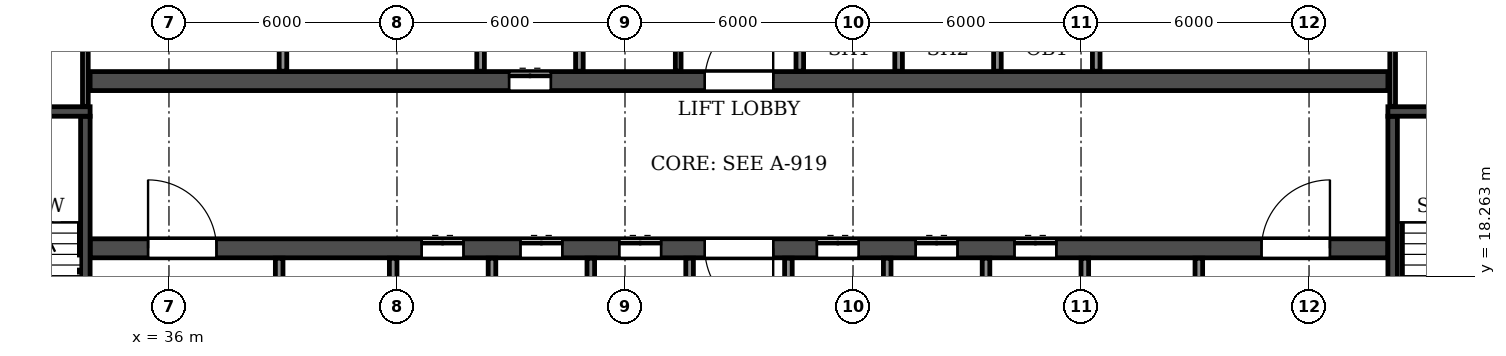
"""IFC4 building model, lengths in metres.
Left out: names, types, materials, properties, quantities, classifications, styles, units other than length and angle.
Written with IfcOpenShell. Run it as: python <this file> out.ifc"""

import sys

from ifc_helpers import new_model, si_unit, direction, frame, frame_2d, origin, place, context, subcontext, project, spatial, rectangle, extrude, element, fill, save


model = new_model("IFC4")
c1 = context("Model", 3, precision=1e-05, world=origin(), true_north=direction((0.0, 1.0)))
c2 = subcontext(c1, "Body", "Model", "MODEL_VIEW")
j1 = project(units=[si_unit("LENGTHUNIT", "METRE"), si_unit("PLANEANGLEUNIT", "RADIAN")], contexts=[c1])
p1 = place(None, origin())
s1 = spatial("IfcSite", under=j1, at=p1, CompositionType="ELEMENT")
p2 = place(p1, origin())
s2 = spatial("IfcBuilding", under=s1, at=p2, CompositionType="ELEMENT")
p3 = place(p2, frame((0.0, 0.0, 105.9)))
s3 = spatial("IfcBuildingStorey", under=s2, at=p3, CompositionType="ELEMENT", Elevation=105.9)
p4 = place(p3, frame((33.925, 19.0, 0.0), z_axis=(0.0, 0.0, 1.0), x_axis=(1.0, 0.0, 0.0)))
e1 = element("IfcWall", 1, at=p4, inside=s3, PredefinedType="SOLIDWALL", context=c2, shape_type="SweptSolid", body=[
    extrude(rectangle(XDim=34.15, YDim=0.5, at=frame_2d((17.075, 0.0))), origin(), (0.0, 0.0, 1.0), 3.06),
])
p5 = place(p4, frame((16.175, 0.0, 0.0)))
e2 = element("IfcOpeningElement", 2, at=p5, cuts=e1, PredefinedType="OPENING", context=c2, shape_type="SweptSolid", body=[
    extrude(rectangle(XDim=1.8, YDim=2.1, at=frame_2d((0.9, 1.05))), frame((0.0, 0.26, 0.0), z_axis=(0.0, -1.0, 0.0), x_axis=(1.0, 0.0, 0.0)), (0.0, 0.0, 1.0), 0.52),
])
p6 = place(p4, frame((1.525, 0.0, 0.0)))
e3 = element("IfcOpeningElement", 3, at=p6, cuts=e1, PredefinedType="OPENING", context=c2, shape_type="SweptSolid", body=[
    extrude(rectangle(XDim=1.8, YDim=2.1, at=frame_2d((0.9, 1.05))), frame((0.0, 0.26, 0.0), z_axis=(0.0, -1.0, 0.0), x_axis=(1.0, 0.0, 0.0)), (0.0, 0.0, 1.0), 0.52),
])
p7 = place(p4, frame((8.725, 0.0, 0.0)))
e4 = element("IfcOpeningElement", 4, at=p7, cuts=e1, PredefinedType="OPENING", context=c2, shape_type="SweptSolid", body=[
    extrude(rectangle(XDim=1.1, YDim=2.1, at=frame_2d((0.55, 1.05))), frame((0.0, 0.26, 0.0), z_axis=(0.0, -1.0, 0.0), x_axis=(1.0, 0.0, 0.0)), (0.0, 0.0, 1.0), 0.52),
])
p8 = place(p4, frame((11.325, 0.0, 0.0)))
e5 = element("IfcOpeningElement", 5, at=p8, cuts=e1, PredefinedType="OPENING", context=c2, shape_type="SweptSolid", body=[
    extrude(rectangle(XDim=1.1, YDim=2.1, at=frame_2d((0.55, 1.05))), frame((0.0, 0.26, 0.0), z_axis=(0.0, -1.0, 0.0), x_axis=(1.0, 0.0, 0.0)), (0.0, 0.0, 1.0), 0.52),
])
p9 = place(p4, frame((13.925, 0.0, 0.0)))
e6 = element("IfcOpeningElement", 6, at=p9, cuts=e1, PredefinedType="OPENING", context=c2, shape_type="SweptSolid", body=[
    extrude(rectangle(XDim=1.1, YDim=2.1, at=frame_2d((0.55, 1.05))), frame((0.0, 0.26, 0.0), z_axis=(0.0, -1.0, 0.0), x_axis=(1.0, 0.0, 0.0)), (0.0, 0.0, 1.0), 0.52),
])
p10 = place(p4, frame((19.125, 0.0, 0.0)))
e7 = element("IfcOpeningElement", 7, at=p10, cuts=e1, PredefinedType="OPENING", context=c2, shape_type="SweptSolid", body=[
    extrude(rectangle(XDim=1.1, YDim=2.1, at=frame_2d((0.55, 1.05))), frame((0.0, 0.26, 0.0), z_axis=(0.0, -1.0, 0.0), x_axis=(1.0, 0.0, 0.0)), (0.0, 0.0, 1.0), 0.52),
])
p11 = place(p4, frame((21.725, 0.0, 0.0)))
e8 = element("IfcOpeningElement", 8, at=p11, cuts=e1, PredefinedType="OPENING", context=c2, shape_type="SweptSolid", body=[
    extrude(rectangle(XDim=1.1, YDim=2.1, at=frame_2d((0.55, 1.05))), frame((0.0, 0.26, 0.0), z_axis=(0.0, -1.0, 0.0), x_axis=(1.0, 0.0, 0.0)), (0.0, 0.0, 1.0), 0.52),
])
p12 = place(p4, frame((24.325, 0.0, 0.0)))
e9 = element("IfcOpeningElement", 9, at=p12, cuts=e1, PredefinedType="OPENING", context=c2, shape_type="SweptSolid", body=[
    extrude(rectangle(XDim=1.1, YDim=2.1, at=frame_2d((0.55, 1.05))), frame((0.0, 0.26, 0.0), z_axis=(0.0, -1.0, 0.0), x_axis=(1.0, 0.0, 0.0)), (0.0, 0.0, 1.0), 0.52),
])
p13 = place(p4, frame((30.825, 0.0, 0.0)))
e10 = element("IfcOpeningElement", 10, at=p13, cuts=e1, PredefinedType="OPENING", context=c2, shape_type="SweptSolid", body=[
    extrude(rectangle(XDim=1.8, YDim=2.1, at=frame_2d((0.9, 1.05))), frame((0.0, 0.26, 0.0), z_axis=(0.0, -1.0, 0.0), x_axis=(1.0, 0.0, 0.0)), (0.0, 0.0, 1.0), 0.52),
])
p14 = place(p3, frame((33.925, 23.4, 0.0), z_axis=(0.0, 0.0, 1.0), x_axis=(1.0, 0.0, 0.0)))
e11 = element("IfcWall", 11, at=p14, inside=s3, PredefinedType="SOLIDWALL", context=c2, shape_type="SweptSolid", body=[
    extrude(rectangle(XDim=34.15, YDim=0.5, at=frame_2d((17.075, 0.0))), origin(), (0.0, 0.0, 1.0), 3.06),
])
p15 = place(p14, frame((16.175, 0.0, 0.0)))
e12 = element("IfcOpeningElement", 12, at=p15, cuts=e11, PredefinedType="OPENING", context=c2, shape_type="SweptSolid", body=[
    extrude(rectangle(XDim=1.8, YDim=2.1, at=frame_2d((0.9, 1.05))), frame((0.0, 0.26, 0.0), z_axis=(0.0, -1.0, 0.0), x_axis=(1.0, 0.0, 0.0)), (0.0, 0.0, 1.0), 0.52),
])
p16 = place(p14, frame((11.025, 0.0, 0.0)))
e13 = element("IfcOpeningElement", 13, at=p16, cuts=e11, PredefinedType="OPENING", context=c2, shape_type="SweptSolid", body=[
    extrude(rectangle(XDim=1.1, YDim=2.1, at=frame_2d((0.55, 1.05))), frame((0.0, 0.26, 0.0), z_axis=(0.0, -1.0, 0.0), x_axis=(1.0, 0.0, 0.0)), (0.0, 0.0, 1.0), 0.52),
])
p17 = place(p3, frame((33.8, 14.85, 0.0), z_axis=(0.0, 0.0, 1.0), x_axis=(0.0, 1.0, 0.0)))
e14 = element("IfcWall", 14, at=p17, inside=s3, PredefinedType="SOLIDWALL", context=c2, shape_type="SweptSolid", body=[
    extrude(rectangle(XDim=7.625, YDim=0.25, at=frame_2d((3.812, 0.0))), origin(), (0.0, 0.0, 1.0), 3.06),
])
p18 = place(p17, frame((0.45, 0.0, 0.0)))
e15 = element("IfcOpeningElement", 15, at=p18, cuts=e14, PredefinedType="OPENING", context=c2, shape_type="SweptSolid", body=[
    extrude(rectangle(XDim=1.0, YDim=2.1, at=frame_2d((0.5, 1.05))), frame((0.0, 0.135, 0.0), z_axis=(0.0, -1.0, 0.0), x_axis=(1.0, 0.0, 0.0)), (0.0, 0.0, 1.0), 0.27),
])
p19 = place(p3, frame((29.875, 22.6, 0.0), z_axis=(0.0, 0.0, 1.0), x_axis=(1.0, 0.0, 0.0)))
e16 = element("IfcWall", 16, at=p19, inside=s3, PredefinedType="SOLIDWALL", context=c2, shape_type="SweptSolid", body=[
    extrude(rectangle(XDim=4.05, YDim=0.25, at=frame_2d((2.025, 0.0))), origin(), (0.0, 0.0, 1.0), 3.06),
])
p20 = place(p3, frame((68.2, 14.85, 0.0), z_axis=(0.0, 0.0, 1.0), x_axis=(0.0, 1.0, 0.0)))
e17 = element("IfcWall", 17, at=p20, inside=s3, PredefinedType="SOLIDWALL", context=c2, shape_type="SweptSolid", body=[
    extrude(rectangle(XDim=7.625, YDim=0.25, at=frame_2d((3.812, 0.0))), origin(), (0.0, 0.0, 1.0), 3.06),
])
p21 = place(p20, frame((0.45, 0.0, 0.0)))
e18 = element("IfcOpeningElement", 18, at=p21, cuts=e17, PredefinedType="OPENING", context=c2, shape_type="SweptSolid", body=[
    extrude(rectangle(XDim=1.0, YDim=2.1, at=frame_2d((0.5, 1.05))), frame((0.0, 0.135, 0.0), z_axis=(0.0, -1.0, 0.0), x_axis=(1.0, 0.0, 0.0)), (0.0, 0.0, 1.0), 0.27),
])
p22 = place(p3, frame((68.075, 22.6, 0.0), z_axis=(0.0, 0.0, 1.0), x_axis=(1.0, 0.0, 0.0)))
e19 = element("IfcWall", 19, at=p22, inside=s3, PredefinedType="SOLIDWALL", context=c2, shape_type="SweptSolid", body=[
    extrude(rectangle(XDim=4.05, YDim=0.25, at=frame_2d((2.025, 0.0))), origin(), (0.0, 0.0, 1.0), 3.06),
])
p23 = place(p3, frame((49.4, 23.66, 0.0), z_axis=(0.0, 0.0, 1.0), x_axis=(0.0, 1.0, 0.0)))
e20 = element("IfcWall", 20, at=p23, inside=s3, PredefinedType="PARTITIONING", context=c2, shape_type="SweptSolid", body=[
    extrude(rectangle(XDim=3.88, YDim=0.15, at=frame_2d((1.94, 0.0))), origin(), (0.0, 0.0, 1.0), 3.06),
])
p24 = place(p3, frame((39.0, 23.66, 0.0), z_axis=(0.0, 0.0, 1.0), x_axis=(0.0, 1.0, 0.0)))
e21 = element("IfcWall", 21, at=p24, inside=s3, PredefinedType="PARTITIONING", context=c2, shape_type="SweptSolid", body=[
    extrude(rectangle(XDim=3.88, YDim=0.2, at=frame_2d((1.94, 0.0))), origin(), (0.0, 0.0, 1.0), 3.06),
])
for number, where, z_axis, x_axis in (
    (22, (33.8, 22.735, 0.0), (0.0, 0.0, 1.0), (0.0, 1.0, 0.0)),
    (23, (68.2, 22.735, 0.0), (0.0, 0.0, 1.0), (0.0, 1.0, 0.0)),
):
    element("IfcWall", number, at=place(p3, frame(where, z_axis=z_axis, x_axis=x_axis)), inside=s3, PredefinedType="PARTITIONING", context=c2, shape_type="SweptSolid", body=[
        extrude(rectangle(XDim=4.805, YDim=0.15, at=frame_2d((2.402, 0.0))), origin(), (0.0, 0.0, 1.0), 3.06),
    ])
p25 = place(p3, frame((38.9, 14.86, 0.0), z_axis=(0.0, 0.0, 1.0), x_axis=(0.0, 1.0, 0.0)))
e24 = element("IfcWall", 24, at=p25, inside=s3, PredefinedType="PARTITIONING", context=c2, shape_type="SweptSolid", body=[
    extrude(rectangle(XDim=3.88, YDim=0.2, at=frame_2d((1.94, 0.0))), origin(), (0.0, 0.0, 1.0), 3.06),
])
p26 = place(p25, frame((1.39, 0.0, 0.0)))
e25 = element("IfcOpeningElement", 25, at=p26, cuts=e24, PredefinedType="OPENING", context=c2, shape_type="SweptSolid", body=[
    extrude(rectangle(XDim=1.1, YDim=2.1, at=frame_2d((0.55, 1.05))), frame((0.0, 0.11, 0.0), z_axis=(0.0, -1.0, 0.0), x_axis=(1.0, 0.0, 0.0)), (0.0, 0.0, 1.0), 0.22),
])
p27 = place(p3, frame((41.9, 14.86, 0.0), z_axis=(0.0, 0.0, 1.0), x_axis=(0.0, 1.0, 0.0)))
e26 = element("IfcWall", 26, at=p27, inside=s3, PredefinedType="PARTITIONING", context=c2, shape_type="SweptSolid", body=[
    extrude(rectangle(XDim=3.88, YDim=0.2, at=frame_2d((1.94, 0.0))), origin(), (0.0, 0.0, 1.0), 3.06),
])
p28 = place(p3, frame((44.2, 23.66, 0.0), z_axis=(0.0, 0.0, 1.0), x_axis=(0.0, 1.0, 0.0)))
e27 = element("IfcWall", 27, at=p28, inside=s3, PredefinedType="PARTITIONING", context=c2, shape_type="SweptSolid", body=[
    extrude(rectangle(XDim=3.88, YDim=0.2, at=frame_2d((1.94, 0.0))), origin(), (0.0, 0.0, 1.0), 3.06),
])
p29 = place(p3, frame((44.5, 16.3, 0.0), z_axis=(0.0, 0.0, 1.0), x_axis=(0.0, 1.0, 0.0)))
e28 = element("IfcWall", 28, at=p29, inside=s3, PredefinedType="PARTITIONING", context=c2, shape_type="SweptSolid", body=[
    extrude(rectangle(XDim=2.44, YDim=0.2, at=frame_2d((1.22, 0.0))), origin(), (0.0, 0.0, 1.0), 3.06),
])
p30 = place(p3, frame((46.8, 23.66, 0.0), z_axis=(0.0, 0.0, 1.0), x_axis=(0.0, 1.0, 0.0)))
e29 = element("IfcWall", 29, at=p30, inside=s3, PredefinedType="PARTITIONING", context=c2, shape_type="SweptSolid", body=[
    extrude(rectangle(XDim=3.88, YDim=0.2, at=frame_2d((1.94, 0.0))), origin(), (0.0, 0.0, 1.0), 3.06),
])
for number, where, z_axis, x_axis in (
    (30, (47.1, 16.3, 0.0), (0.0, 0.0, 1.0), (0.0, 1.0, 0.0)),
    (31, (49.7, 16.3, 0.0), (0.0, 0.0, 1.0), (0.0, 1.0, 0.0)),
    (32, (52.3, 16.3, 0.0), (0.0, 0.0, 1.0), (0.0, 1.0, 0.0)),
):
    element("IfcWall", number, at=place(p3, frame(where, z_axis=z_axis, x_axis=x_axis)), inside=s3, PredefinedType="PARTITIONING", context=c2, shape_type="SweptSolid", body=[
        extrude(rectangle(XDim=2.44, YDim=0.2, at=frame_2d((1.22, 0.0))), origin(), (0.0, 0.0, 1.0), 3.06),
    ])
p31 = place(p3, frame((52.6, 23.66, 0.0), z_axis=(0.0, 0.0, 1.0), x_axis=(0.0, 1.0, 0.0)))
e33 = element("IfcWall", 33, at=p31, inside=s3, PredefinedType="PARTITIONING", context=c2, shape_type="SweptSolid", body=[
    extrude(rectangle(XDim=2.44, YDim=0.2, at=frame_2d((1.22, 0.0))), origin(), (0.0, 0.0, 1.0), 3.06),
])
p32 = place(p3, frame((54.9, 16.3, 0.0), z_axis=(0.0, 0.0, 1.0), x_axis=(0.0, 1.0, 0.0)))
e34 = element("IfcWall", 34, at=p32, inside=s3, PredefinedType="PARTITIONING", context=c2, shape_type="SweptSolid", body=[
    extrude(rectangle(XDim=2.44, YDim=0.2, at=frame_2d((1.22, 0.0))), origin(), (0.0, 0.0, 1.0), 3.06),
])
p33 = place(p3, frame((55.2, 23.66, 0.0), z_axis=(0.0, 0.0, 1.0), x_axis=(0.0, 1.0, 0.0)))
e35 = element("IfcWall", 35, at=p33, inside=s3, PredefinedType="PARTITIONING", context=c2, shape_type="SweptSolid", body=[
    extrude(rectangle(XDim=2.44, YDim=0.2, at=frame_2d((1.22, 0.0))), origin(), (0.0, 0.0, 1.0), 3.06),
])
p34 = place(p3, frame((57.5, 16.3, 0.0), z_axis=(0.0, 0.0, 1.0), x_axis=(0.0, 1.0, 0.0)))
e36 = element("IfcWall", 36, at=p34, inside=s3, PredefinedType="PARTITIONING", context=c2, shape_type="SweptSolid", body=[
    extrude(rectangle(XDim=2.44, YDim=0.2, at=frame_2d((1.22, 0.0))), origin(), (0.0, 0.0, 1.0), 3.06),
])
p35 = place(p3, frame((57.8, 23.66, 0.0), z_axis=(0.0, 0.0, 1.0), x_axis=(0.0, 1.0, 0.0)))
e37 = element("IfcWall", 37, at=p35, inside=s3, PredefinedType="PARTITIONING", context=c2, shape_type="SweptSolid", body=[
    extrude(rectangle(XDim=2.44, YDim=0.2, at=frame_2d((1.22, 0.0))), origin(), (0.0, 0.0, 1.0), 3.06),
])
p36 = place(p3, frame((60.1, 14.86, 0.0), z_axis=(0.0, 0.0, 1.0), x_axis=(0.0, 1.0, 0.0)))
e38 = element("IfcWall", 38, at=p36, inside=s3, PredefinedType="PARTITIONING", context=c2, shape_type="SweptSolid", body=[
    extrude(rectangle(XDim=3.88, YDim=0.2, at=frame_2d((1.94, 0.0))), origin(), (0.0, 0.0, 1.0), 3.06),
])
p37 = place(p3, frame((60.4, 23.66, 0.0), z_axis=(0.0, 0.0, 1.0), x_axis=(0.0, 1.0, 0.0)))
e39 = element("IfcWall", 39, at=p37, inside=s3, PredefinedType="PARTITIONING", context=c2, shape_type="SweptSolid", body=[
    extrude(rectangle(XDim=2.44, YDim=0.2, at=frame_2d((1.22, 0.0))), origin(), (0.0, 0.0, 1.0), 3.06),
])
p38 = place(p3, frame((63.1, 14.86, 0.0), z_axis=(0.0, 0.0, 1.0), x_axis=(0.0, 1.0, 0.0)))
e40 = element("IfcWall", 40, at=p38, inside=s3, PredefinedType="PARTITIONING", context=c2, shape_type="SweptSolid", body=[
    extrude(rectangle(XDim=3.88, YDim=0.2, at=frame_2d((1.94, 0.0))), origin(), (0.0, 0.0, 1.0), 3.06),
])
p39 = place(p38, frame((1.39, 0.0, 0.0)))
e41 = element("IfcOpeningElement", 41, at=p39, cuts=e40, PredefinedType="OPENING", context=c2, shape_type="SweptSolid", body=[
    extrude(rectangle(XDim=1.1, YDim=2.1, at=frame_2d((0.55, 1.05))), frame((0.0, 0.11, 0.0), z_axis=(0.0, -1.0, 0.0), x_axis=(1.0, 0.0, 0.0)), (0.0, 0.0, 1.0), 0.22),
])
p40 = place(p15, origin())
e42 = element("IfcDoor", 42, at=p40, inside=s3, OperationType="DOUBLE_DOOR_SINGLE_SWING", PredefinedType="DOOR", context=c2, shape_type="SweptSolid", body=[
    extrude(rectangle(XDim=1.8, YDim=2.1, at=frame_2d((0.9, 1.05))), frame((0.0, 0.025, 0.0), z_axis=(0.0, -1.0, 0.0), x_axis=(1.0, 0.0, 0.0)), (0.0, 0.0, 1.0), 0.05),
])
fill(e12, e42)
p41 = place(p5, frame((1.8, 0.0, 0.0), z_axis=(0.0, 0.0, 1.0), x_axis=(-1.0, 0.0, 0.0)))
e43 = element("IfcDoor", 43, at=p41, inside=s3, OperationType="DOUBLE_DOOR_SINGLE_SWING", PredefinedType="DOOR", context=c2, shape_type="SweptSolid", body=[
    extrude(rectangle(XDim=1.8, YDim=2.1, at=frame_2d((0.9, 1.05))), frame((0.0, 0.025, 0.0), z_axis=(0.0, -1.0, 0.0), x_axis=(1.0, 0.0, 0.0)), (0.0, 0.0, 1.0), 0.05),
])
fill(e2, e43)
p42 = place(p6, origin())
e44 = element("IfcDoor", 44, at=p42, inside=s3, OperationType="DOUBLE_DOOR_SINGLE_SWING", PredefinedType="DOOR", context=c2, shape_type="SweptSolid", body=[
    extrude(rectangle(XDim=1.8, YDim=2.1, at=frame_2d((0.9, 1.05))), frame((0.0, 0.025, 0.0), z_axis=(0.0, -1.0, 0.0), x_axis=(1.0, 0.0, 0.0)), (0.0, 0.0, 1.0), 0.05),
])
fill(e3, e44)
p43 = place(p7, origin())
e45 = element("IfcDoor", 45, at=p43, inside=s3, OperationType="DOUBLE_DOOR_SLIDING", PredefinedType="DOOR", context=c2, shape_type="SweptSolid", body=[
    extrude(rectangle(XDim=1.1, YDim=2.1, at=frame_2d((0.55, 1.05))), frame((0.0, 0.025, 0.0), z_axis=(0.0, -1.0, 0.0), x_axis=(1.0, 0.0, 0.0)), (0.0, 0.0, 1.0), 0.05),
])
fill(e4, e45)
p44 = place(p16, origin())
e46 = element("IfcDoor", 46, at=p44, inside=s3, OperationType="DOUBLE_DOOR_SLIDING", PredefinedType="DOOR", context=c2, shape_type="SweptSolid", body=[
    extrude(rectangle(XDim=1.1, YDim=2.1, at=frame_2d((0.55, 1.05))), frame((0.0, 0.025, 0.0), z_axis=(0.0, -1.0, 0.0), x_axis=(1.0, 0.0, 0.0)), (0.0, 0.0, 1.0), 0.05),
])
fill(e13, e46)
p45 = place(p8, origin())
e47 = element("IfcDoor", 47, at=p45, inside=s3, OperationType="DOUBLE_DOOR_SLIDING", PredefinedType="DOOR", context=c2, shape_type="SweptSolid", body=[
    extrude(rectangle(XDim=1.1, YDim=2.1, at=frame_2d((0.55, 1.05))), frame((0.0, 0.025, 0.0), z_axis=(0.0, -1.0, 0.0), x_axis=(1.0, 0.0, 0.0)), (0.0, 0.0, 1.0), 0.05),
])
fill(e5, e47)
p46 = place(p9, origin())
e48 = element("IfcDoor", 48, at=p46, inside=s3, OperationType="DOUBLE_DOOR_SLIDING", PredefinedType="DOOR", context=c2, shape_type="SweptSolid", body=[
    extrude(rectangle(XDim=1.1, YDim=2.1, at=frame_2d((0.55, 1.05))), frame((0.0, 0.025, 0.0), z_axis=(0.0, -1.0, 0.0), x_axis=(1.0, 0.0, 0.0)), (0.0, 0.0, 1.0), 0.05),
])
fill(e6, e48)
p47 = place(p10, origin())
e49 = element("IfcDoor", 49, at=p47, inside=s3, OperationType="DOUBLE_DOOR_SLIDING", PredefinedType="DOOR", context=c2, shape_type="SweptSolid", body=[
    extrude(rectangle(XDim=1.1, YDim=2.1, at=frame_2d((0.55, 1.05))), frame((0.0, 0.025, 0.0), z_axis=(0.0, -1.0, 0.0), x_axis=(1.0, 0.0, 0.0)), (0.0, 0.0, 1.0), 0.05),
])
fill(e7, e49)
p48 = place(p11, origin())
e50 = element("IfcDoor", 50, at=p48, inside=s3, OperationType="DOUBLE_DOOR_SLIDING", PredefinedType="DOOR", context=c2, shape_type="SweptSolid", body=[
    extrude(rectangle(XDim=1.1, YDim=2.1, at=frame_2d((0.55, 1.05))), frame((0.0, 0.025, 0.0), z_axis=(0.0, -1.0, 0.0), x_axis=(1.0, 0.0, 0.0)), (0.0, 0.0, 1.0), 0.05),
])
fill(e8, e50)
p49 = place(p12, origin())
e51 = element("IfcDoor", 51, at=p49, inside=s3, OperationType="DOUBLE_DOOR_SLIDING", PredefinedType="DOOR", context=c2, shape_type="SweptSolid", body=[
    extrude(rectangle(XDim=1.1, YDim=2.1, at=frame_2d((0.55, 1.05))), frame((0.0, 0.025, 0.0), z_axis=(0.0, -1.0, 0.0), x_axis=(1.0, 0.0, 0.0)), (0.0, 0.0, 1.0), 0.05),
])
fill(e9, e51)
p50 = place(p13, origin())
e52 = element("IfcDoor", 52, at=p50, inside=s3, OperationType="DOUBLE_DOOR_SINGLE_SWING", PredefinedType="DOOR", context=c2, shape_type="SweptSolid", body=[
    extrude(rectangle(XDim=1.8, YDim=2.1, at=frame_2d((0.9, 1.05))), frame((0.0, 0.025, 0.0), z_axis=(0.0, -1.0, 0.0), x_axis=(1.0, 0.0, 0.0)), (0.0, 0.0, 1.0), 0.05),
])
fill(e10, e52)
save(model, sys.argv[1])
